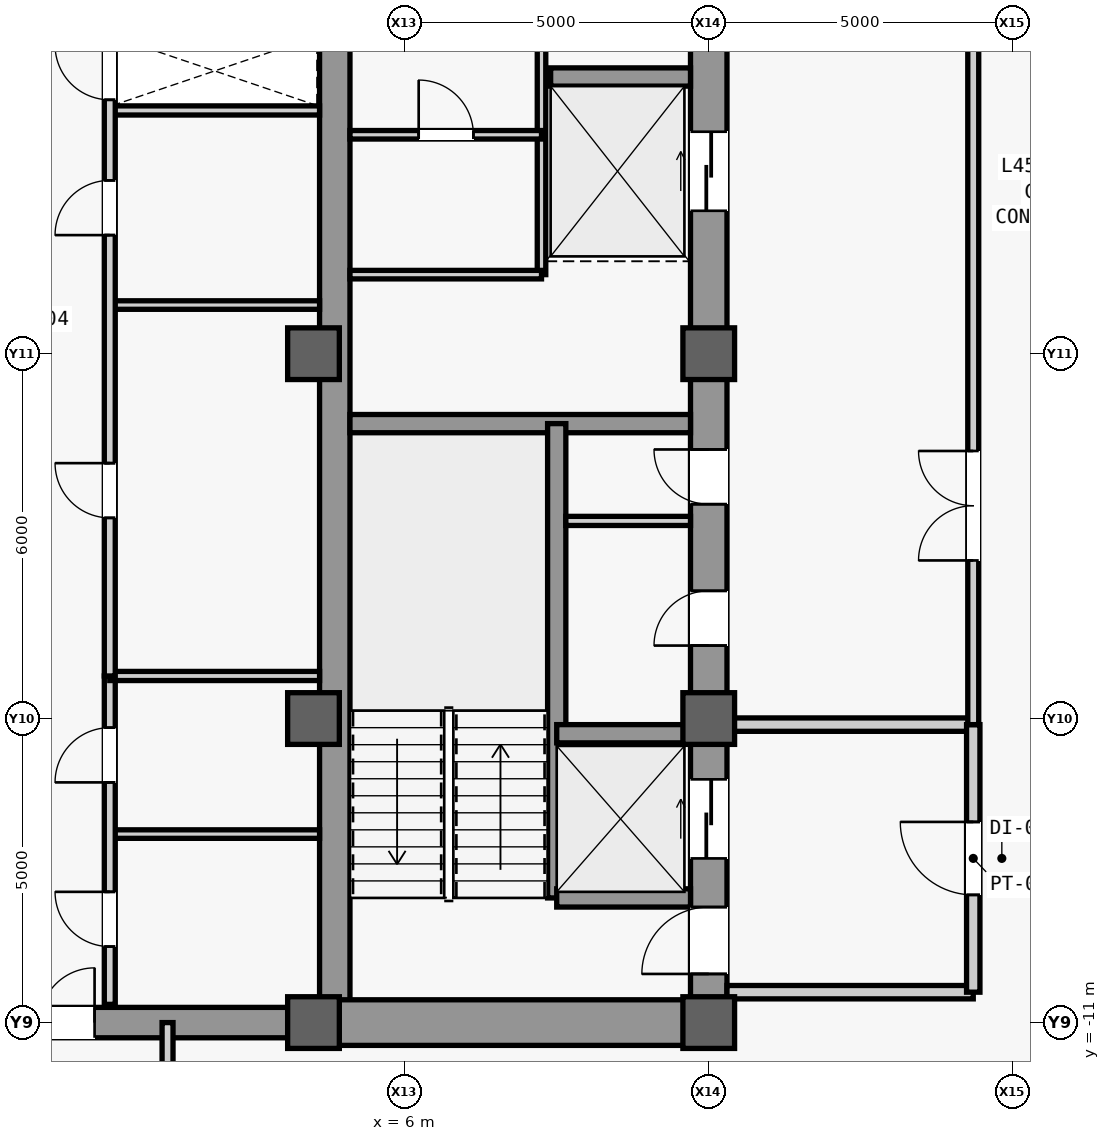
"""IFC4 building model, lengths in metres.
Left out: names, types, materials, properties, quantities, classifications, styles, units other than length and angle.
Written with IfcOpenShell. Run it as: python <this file> out.ifc"""

import sys

from ifc_helpers import new_model, si_unit, direction, frame, frame_2d, origin, origin_2d, place, context, subcontext, project, spatial, rectangle, extrude, source, transform, mapped, element, fill, save


model = new_model("IFC4")
c1 = context("Model", 3, precision=1e-05, world=origin(), true_north=direction((0.0, 1.0)))
c2 = subcontext(c1, "Body", "Model", "MODEL_VIEW")
j1 = project(units=[si_unit("LENGTHUNIT", "METRE"), si_unit("PLANEANGLEUNIT", "RADIAN")], contexts=[c1])
p1 = place(None, origin())
s1 = spatial("IfcSite", under=j1, at=p1, CompositionType="ELEMENT")
p2 = place(p1, origin())
s2 = spatial("IfcBuilding", under=s1, at=p2, CompositionType="ELEMENT")
p3 = place(p2, frame((0.0, 0.0, 195.1)))
s3 = spatial("IfcBuildingStorey", under=s2, at=p3, CompositionType="ELEMENT", Elevation=195.1)
m1 = source(origin(), c2, "Body", "SweptSolid", [
    extrude(rectangle(XDim=22.0, YDim=0.6, at=frame_2d((11.0, 0.0))), origin(), (0.0, 0.0, 1.0), 3.78),
])
p4 = place(p3, frame((11.0, -11.0, 0.0), z_axis=(0.0, 0.0, 1.0), x_axis=(0.0, 1.0, 0.0)))
e1 = element("IfcWall", 1, at=p4, inside=s3, PredefinedType="SHEAR", context=c2, shape_type="MappedRepresentation", body=[
    mapped(m1, transform((0.0, 0.0, 0.0), scale=1.0)),
])
m2 = source(origin(), c2, "Body", "SweptSolid", [
    extrude(rectangle(XDim=1.1, YDim=2.2, at=frame_2d((0.55, 1.1))), frame((0.0, 0.31, 0.0), z_axis=(0.0, -1.0, 0.0), x_axis=(1.0, 0.0, 0.0)), (0.0, 0.0, 1.0), 0.62),
])
p5 = place(p4, frame((0.8, 0.0, 0.0)))
e2 = element("IfcOpeningElement", 2, at=p5, cuts=e1, PredefinedType="OPENING", context=c2, shape_type="MappedRepresentation", body=[
    mapped(m2, transform((0.0, 0.0, 0.0), scale=1.0)),
])
m3 = source(origin(), c2, "Body", "SweptSolid", [
    extrude(rectangle(XDim=0.9, YDim=2.15, at=frame_2d((0.45, 1.075))), frame((0.0, 0.31, 0.0), z_axis=(0.0, -1.0, 0.0), x_axis=(1.0, 0.0, 0.0)), (0.0, 0.0, 1.0), 0.62),
])
p6 = place(p4, frame((6.2, 0.0, 0.0)))
e3 = element("IfcOpeningElement", 3, at=p6, cuts=e1, PredefinedType="OPENING", context=c2, shape_type="MappedRepresentation", body=[
    mapped(m3, transform((0.0, 0.0, 0.0), scale=1.0)),
])
p7 = place(p4, frame((8.525, 0.0, 0.0)))
e4 = element("IfcOpeningElement", 4, at=p7, cuts=e1, PredefinedType="OPENING", context=c2, shape_type="MappedRepresentation", body=[
    mapped(m3, transform((0.0, 0.0, 0.0), scale=1.0)),
])
m4 = source(origin(), c2, "Body", "SweptSolid", [
    extrude(rectangle(XDim=1.3, YDim=2.3, at=frame_2d((0.65, 1.15))), frame((0.0, 0.31, 0.0), z_axis=(0.0, -1.0, 0.0), x_axis=(1.0, 0.0, 0.0)), (0.0, 0.0, 1.0), 0.62),
])
p8 = place(p4, frame((2.7, 0.0, 0.0)))
e5 = element("IfcOpeningElement", 5, at=p8, cuts=e1, PredefinedType="OPENING", context=c2, shape_type="MappedRepresentation", body=[
    mapped(m4, transform((0.0, 0.0, 0.0), scale=1.0)),
])
p9 = place(p4, frame((13.35, 0.0, 0.0)))
e6 = element("IfcOpeningElement", 6, at=p9, cuts=e1, PredefinedType="OPENING", context=c2, shape_type="MappedRepresentation", body=[
    mapped(m4, transform((0.0, 0.0, 0.0), scale=1.0)),
])
m5 = source(origin(), c2, "Body", "SweptSolid", [
    extrude(rectangle(XDim=21.4, YDim=0.5, at=frame_2d((10.7, 0.0))), origin(), (0.0, 0.0, 1.0), 3.78),
])
p10 = place(p3, frame((4.85, -10.7, 0.0), z_axis=(0.0, 0.0, 1.0), x_axis=(0.0, 1.0, 0.0)))
e7 = element("IfcWall", 7, at=p10, inside=s3, PredefinedType="SHEAR", context=c2, shape_type="MappedRepresentation", body=[
    mapped(m5, transform((0.0, 0.0, 0.0), scale=1.0)),
])
m6 = source(origin(), c2, "Body", "SweptSolid", [
    extrude(rectangle(XDim=5.85, YDim=0.75, at=frame_2d((2.925, 0.0))), origin(), (0.0, 0.0, 1.0), 3.78),
])
p11 = place(p3, frame((4.85, -11.0, 0.0), z_axis=(0.0, 0.0, 1.0), x_axis=(1.0, 0.0, 0.0)))
e8 = element("IfcWall", 8, at=p11, inside=s3, PredefinedType="SHEAR", context=c2, shape_type="MappedRepresentation", body=[
    mapped(m6, transform((0.0, 0.0, 0.0), scale=1.0)),
])
m7 = source(origin(), c2, "Body", "SweptSolid", [
    extrude(rectangle(XDim=5.6, YDim=0.3, at=frame_2d((2.8, 0.0))), origin(), (0.0, 0.0, 1.0), 3.78),
])
p12 = place(p3, frame((5.1, -1.15, 0.0), z_axis=(0.0, 0.0, 1.0), x_axis=(1.0, 0.0, 0.0)))
e9 = element("IfcWall", 9, at=p12, inside=s3, PredefinedType="SHEAR", context=c2, shape_type="MappedRepresentation", body=[
    mapped(m7, transform((0.0, 0.0, 0.0), scale=1.0)),
])
m8 = source(origin(), c2, "Body", "SweptSolid", [
    extrude(rectangle(XDim=9.2, YDim=0.5, at=frame_2d((4.6, 0.0))), origin(), (0.0, 0.0, 1.0), 3.78),
])
p13 = place(p3, frame((-4.6, -11.0, 0.0), z_axis=(0.0, 0.0, 1.0), x_axis=(1.0, 0.0, 0.0)))
e10 = element("IfcWall", 10, at=p13, inside=s3, PredefinedType="SHEAR", context=c2, shape_type="MappedRepresentation", body=[
    mapped(m8, transform((0.0, 0.0, 0.0), scale=1.0)),
])
m9 = source(origin(), c2, "Body", "SweptSolid", [
    extrude(rectangle(XDim=1.8, YDim=2.25, at=frame_2d((0.9, 1.125))), frame((0.0, 0.26, 0.0), z_axis=(0.0, -1.0, 0.0), x_axis=(1.0, 0.0, 0.0)), (0.0, 0.0, 1.0), 0.52),
])
p14 = place(p13, frame((3.7, 0.0, 0.0)))
e11 = element("IfcOpeningElement", 11, at=p14, cuts=e10, PredefinedType="OPENING", context=c2, shape_type="MappedRepresentation", body=[
    mapped(m9, transform((0.0, 0.0, 0.0), scale=1.0)),
])
m10 = source(origin(), c2, "Body", "SweptSolid", [
    extrude(rectangle(XDim=0.85, YDim=0.85, at=origin_2d()), origin(), (0.0, 0.0, 1.0), 4.0),
])
for number, where, z_axis, x_axis in (
    (12, (4.5, -11.0, 0.0), (0.0, 0.0, 1.0), (1.0, 0.0, 0.0)),
    (13, (4.5, -6.0, 0.0), (0.0, 0.0, 1.0), (1.0, 0.0, 0.0)),
    (14, (4.5, 0.0, 0.0), (0.0, 0.0, 1.0), (1.0, 0.0, 0.0)),
    (15, (11.0, -11.0, 0.0), (0.0, 0.0, 1.0), (1.0, 0.0, 0.0)),
    (16, (11.0, -6.0, 0.0), (0.0, 0.0, 1.0), (1.0, 0.0, 0.0)),
    (17, (11.0, 0.0, 0.0), (0.0, 0.0, 1.0), (1.0, 0.0, 0.0)),
):
    element("IfcColumn", number, at=place(p3, frame(where, z_axis=z_axis, x_axis=x_axis)), inside=s3, PredefinedType="COLUMN", context=c2, shape_type="MappedRepresentation", body=[
        mapped(m10, transform((0.0, 0.0, 0.0), scale=1.0)),
    ])
m11 = source(origin(), c2, "Body", "SweptSolid", [
    extrude(rectangle(XDim=7.8, YDim=0.3, at=frame_2d((3.9, 0.0))), origin(), (0.0, 0.0, 1.0), 3.78),
])
p15 = place(p3, frame((8.5, -8.95, 0.0), z_axis=(0.0, 0.0, 1.0), x_axis=(0.0, 1.0, 0.0)))
e18 = element("IfcWall", 18, at=p15, inside=s3, PredefinedType="SHEAR", context=c2, shape_type="MappedRepresentation", body=[
    mapped(m11, transform((0.0, 0.0, 0.0), scale=1.0)),
])
m12 = source(origin(), c2, "Body", "SweptSolid", [
    extrude(rectangle(XDim=2.2, YDim=0.3, at=frame_2d((1.1, 0.0))), origin(), (0.0, 0.0, 1.0), 3.78),
])
for number, where, z_axis, x_axis in (
    (19, (8.5, -8.95, 0.0), (0.0, 0.0, 1.0), (1.0, 0.0, 0.0)),
    (20, (8.5, -6.25, 0.0), (0.0, 0.0, 1.0), (1.0, 0.0, 0.0)),
):
    element("IfcWall", number, at=place(p3, frame(where, z_axis=z_axis, x_axis=x_axis)), inside=s3, PredefinedType="SHEAR", context=c2, shape_type="MappedRepresentation", body=[
        mapped(m12, transform((0.0, 0.0, 0.0), scale=1.0)),
    ])
m13 = source(origin(), c2, "Body", "SweptSolid", [
    extrude(rectangle(XDim=2.3, YDim=0.3, at=frame_2d((1.15, 0.0))), origin(), (0.0, 0.0, 1.0), 3.78),
])
p16 = place(p3, frame((8.4, 4.55, 0.0), z_axis=(0.0, 0.0, 1.0), x_axis=(1.0, 0.0, 0.0)))
e21 = element("IfcWall", 21, at=p16, inside=s3, PredefinedType="SHEAR", context=c2, shape_type="MappedRepresentation", body=[
    mapped(m13, transform((0.0, 0.0, 0.0), scale=1.0)),
])
m14 = source(origin(), c2, "Body", "SweptSolid", [
    extrude(rectangle(XDim=2.05, YDim=0.15, at=frame_2d((1.025, 0.0))), origin(), (0.0, 0.0, 1.0), 3.78),
])
p17 = place(p3, frame((8.65, -2.75, 0.0), z_axis=(0.0, 0.0, 1.0), x_axis=(1.0, 0.0, 0.0)))
e22 = element("IfcWall", 22, at=p17, inside=s3, PredefinedType="PARTITIONING", context=c2, shape_type="MappedRepresentation", body=[
    mapped(m14, transform((0.0, 0.0, 0.0), scale=1.0)),
])
m15 = source(origin(), c2, "Body", "SweptSolid", [
    extrude(rectangle(XDim=9.4, YDim=0.14, at=frame_2d((4.7, 0.0))), origin(), (0.0, 0.0, 1.0), 3.78),
])
p18 = place(p3, frame((8.25, 1.3, 0.0), z_axis=(0.0, 0.0, 1.0), x_axis=(0.0, 1.0, 0.0)))
e23 = element("IfcWall", 23, at=p18, inside=s3, PredefinedType="PARTITIONING", context=c2, shape_type="MappedRepresentation", body=[
    mapped(m15, transform((0.0, 0.0, 0.0), scale=1.0)),
])
m16 = source(origin(), c2, "Body", "SweptSolid", [
    extrude(rectangle(XDim=3.15, YDim=0.14, at=frame_2d((1.575, 0.0))), origin(), (0.0, 0.0, 1.0), 3.78),
])
p19 = place(p3, frame((5.1, 1.3, 0.0), z_axis=(0.0, 0.0, 1.0), x_axis=(1.0, 0.0, 0.0)))
e24 = element("IfcWall", 24, at=p19, inside=s3, PredefinedType="PARTITIONING", context=c2, shape_type="MappedRepresentation", body=[
    mapped(m16, transform((0.0, 0.0, 0.0), scale=1.0)),
])
p20 = place(p3, frame((5.1, 3.6, 0.0), z_axis=(0.0, 0.0, 1.0), x_axis=(1.0, 0.0, 0.0)))
e25 = element("IfcWall", 25, at=p20, inside=s3, PredefinedType="PARTITIONING", context=c2, shape_type="MappedRepresentation", body=[
    mapped(m16, transform((0.0, 0.0, 0.0), scale=1.0)),
])
m17 = source(origin(), c2, "Body", "SweptSolid", [
    extrude(rectangle(XDim=0.9, YDim=2.15, at=frame_2d((0.45, 1.075))), frame((0.0, 0.08, 0.0), z_axis=(0.0, -1.0, 0.0), x_axis=(1.0, 0.0, 0.0)), (0.0, 0.0, 1.0), 0.16),
])
p21 = place(p20, frame((1.13, 0.0, 0.0)))
e26 = element("IfcOpeningElement", 26, at=p21, cuts=e25, PredefinedType="OPENING", context=c2, shape_type="MappedRepresentation", body=[
    mapped(m17, transform((0.0, 0.0, 0.0), scale=1.0)),
])
m18 = source(origin(), c2, "Body", "SweptSolid", [
    extrude(rectangle(XDim=4.05, YDim=0.22, at=frame_2d((2.025, 0.0))), origin(), (0.0, 0.0, 1.0), 3.78),
])
p22 = place(p3, frame((11.3, -10.5, 0.0), z_axis=(0.0, 0.0, 1.0), x_axis=(1.0, 0.0, 0.0)))
e27 = element("IfcWall", 27, at=p22, inside=s3, PredefinedType="PARTITIONING", context=c2, shape_type="MappedRepresentation", body=[
    mapped(m18, transform((0.0, 0.0, 0.0), scale=1.0)),
])
m19 = source(origin(), c2, "Body", "SweptSolid", [
    extrude(rectangle(XDim=4.05, YDim=0.22, at=frame_2d((2.025, 0.0))), origin(), (0.0, 0.0, 1.0), 3.007),
])
p23 = place(p3, frame((11.3, -6.1, 0.0), z_axis=(0.0, 0.0, 1.0), x_axis=(1.0, 0.0, 0.0)))
e28 = element("IfcWall", 28, at=p23, inside=s3, PredefinedType="PARTITIONING", context=c2, shape_type="MappedRepresentation", body=[
    mapped(m19, transform((0.0, 0.0, 0.0), scale=1.0)),
])
m20 = source(origin(), c2, "Body", "SweptSolid", [
    extrude(rectangle(XDim=4.4, YDim=0.22, at=frame_2d((2.2, 0.0))), origin(), (0.0, 0.0, 1.0), 3.78),
])
p24 = place(p3, frame((15.35, -10.5, 0.0), z_axis=(0.0, 0.0, 1.0), x_axis=(0.0, 1.0, 0.0)))
e29 = element("IfcWall", 29, at=p24, inside=s3, PredefinedType="PARTITIONING", context=c2, shape_type="MappedRepresentation", body=[
    mapped(m20, transform((0.0, 0.0, 0.0), scale=1.0)),
])
m21 = source(origin(), c2, "Body", "SweptSolid", [
    extrude(rectangle(XDim=1.2, YDim=2.2, at=frame_2d((0.6, 1.1))), frame((0.0, 0.12, 0.0), z_axis=(0.0, -1.0, 0.0), x_axis=(1.0, 0.0, 0.0)), (0.0, 0.0, 1.0), 0.24),
])
p25 = place(p24, frame((1.6, 0.0, 0.0)))
e30 = element("IfcOpeningElement", 30, at=p25, cuts=e29, PredefinedType="OPENING", context=c2, shape_type="MappedRepresentation", body=[
    mapped(m21, transform((0.0, 0.0, 0.0), scale=1.0)),
])
m22 = source(origin(), c2, "Body", "SweptSolid", [
    extrude(rectangle(XDim=16.6, YDim=0.18, at=frame_2d((8.3, 0.0))), origin(), (0.0, 0.0, 1.0), 3.78),
])
p26 = place(p3, frame((15.35, -6.1, 0.0), z_axis=(0.0, 0.0, 1.0), x_axis=(0.0, 1.0, 0.0)))
e31 = element("IfcWall", 31, at=p26, inside=s3, PredefinedType="PARTITIONING", context=c2, shape_type="MappedRepresentation", body=[
    mapped(m22, transform((0.0, 0.0, 0.0), scale=1.0)),
])
m23 = source(origin(), c2, "Body", "SweptSolid", [
    extrude(rectangle(XDim=1.8, YDim=2.25, at=frame_2d((0.9, 1.125))), frame((0.0, 0.1, 0.0), z_axis=(0.0, -1.0, 0.0), x_axis=(1.0, 0.0, 0.0)), (0.0, 0.0, 1.0), 0.2),
])
p27 = place(p26, frame((2.7, 0.0, 0.0)))
e32 = element("IfcOpeningElement", 32, at=p27, cuts=e31, PredefinedType="OPENING", context=c2, shape_type="MappedRepresentation", body=[
    mapped(m23, transform((0.0, 0.0, 0.0), scale=1.0)),
])
p28 = place(p26, frame((13.0, 0.0, 0.0)))
e33 = element("IfcOpeningElement", 33, at=p28, cuts=e31, PredefinedType="OPENING", context=c2, shape_type="MappedRepresentation", body=[
    mapped(m23, transform((0.0, 0.0, 0.0), scale=1.0)),
])
m24 = source(origin(), c2, "Body", "SweptSolid", [
    extrude(rectangle(XDim=3.45, YDim=0.15, at=frame_2d((1.725, 0.0))), origin(), (0.0, 0.0, 1.0), 3.78),
])
p29 = place(p3, frame((1.15, 4.0, 0.0), z_axis=(0.0, 0.0, 1.0), x_axis=(1.0, 0.0, 0.0)))
e34 = element("IfcWall", 34, at=p29, inside=s3, PredefinedType="PARTITIONING", context=c2, shape_type="MappedRepresentation", body=[
    mapped(m24, transform((0.0, 0.0, 0.0), scale=1.0)),
])
m25 = source(origin(), c2, "Body", "SweptSolid", [
    extrude(rectangle(XDim=3.45, YDim=0.14, at=frame_2d((1.725, 0.0))), origin(), (0.0, 0.0, 1.0), 3.78),
])
p30 = place(p3, frame((1.15, -7.9, 0.0), z_axis=(0.0, 0.0, 1.0), x_axis=(1.0, 0.0, 0.0)))
e35 = element("IfcWall", 35, at=p30, inside=s3, PredefinedType="PARTITIONING", context=c2, shape_type="MappedRepresentation", body=[
    mapped(m25, transform((0.0, 0.0, 0.0), scale=1.0)),
])
m26 = source(origin(), c2, "Body", "SweptSolid", [
    extrude(rectangle(XDim=5.4, YDim=0.18, at=frame_2d((2.7, 0.0))), origin(), (0.0, 0.0, 1.0), 3.78),
])
p31 = place(p3, frame((1.15, -10.7, 0.0), z_axis=(0.0, 0.0, 1.0), x_axis=(0.0, 1.0, 0.0)))
e36 = element("IfcWall", 36, at=p31, inside=s3, PredefinedType="PARTITIONING", context=c2, shape_type="MappedRepresentation", body=[
    mapped(m26, transform((0.0, 0.0, 0.0), scale=1.0)),
])
m27 = source(origin(), c2, "Body", "SweptSolid", [
    extrude(rectangle(XDim=0.9, YDim=2.15, at=frame_2d((0.45, 1.075))), frame((0.0, 0.1, 0.0), z_axis=(0.0, -1.0, 0.0), x_axis=(1.0, 0.0, 0.0)), (0.0, 0.0, 1.0), 0.2),
])
p32 = place(p31, frame((0.95, 0.0, 0.0)))
e37 = element("IfcOpeningElement", 37, at=p32, cuts=e36, PredefinedType="OPENING", context=c2, shape_type="MappedRepresentation", body=[
    mapped(m27, transform((0.0, 0.0, 0.0), scale=1.0)),
])
p33 = place(p31, frame((3.65, 0.0, 0.0)))
e38 = element("IfcOpeningElement", 38, at=p33, cuts=e36, PredefinedType="OPENING", context=c2, shape_type="MappedRepresentation", body=[
    mapped(m27, transform((0.0, 0.0, 0.0), scale=1.0)),
])
p34 = place(p3, frame((1.15, -5.3, 0.0), z_axis=(0.0, 0.0, 1.0), x_axis=(1.0, 0.0, 0.0)))
e39 = element("IfcWall", 39, at=p34, inside=s3, PredefinedType="PARTITIONING", context=c2, shape_type="MappedRepresentation", body=[
    mapped(m24, transform((0.0, 0.0, 0.0), scale=1.0)),
])
p35 = place(p3, frame((1.15, 0.8, 0.0), z_axis=(0.0, 0.0, 1.0), x_axis=(1.0, 0.0, 0.0)))
e40 = element("IfcWall", 40, at=p35, inside=s3, PredefinedType="PARTITIONING", context=c2, shape_type="MappedRepresentation", body=[
    mapped(m25, transform((0.0, 0.0, 0.0), scale=1.0)),
])
m28 = source(origin(), c2, "Body", "SweptSolid", [
    extrude(rectangle(XDim=10.6, YDim=0.18, at=frame_2d((5.3, 0.0))), origin(), (0.0, 0.0, 1.0), 3.78),
])
p36 = place(p3, frame((1.15, -5.3, 0.0), z_axis=(0.0, 0.0, 1.0), x_axis=(0.0, 1.0, 0.0)))
e41 = element("IfcWall", 41, at=p36, inside=s3, PredefinedType="PARTITIONING", context=c2, shape_type="MappedRepresentation", body=[
    mapped(m28, transform((0.0, 0.0, 0.0), scale=1.0)),
])
p37 = place(p36, frame((2.6, 0.0, 0.0)))
e42 = element("IfcOpeningElement", 42, at=p37, cuts=e41, PredefinedType="OPENING", context=c2, shape_type="MappedRepresentation", body=[
    mapped(m27, transform((0.0, 0.0, 0.0), scale=1.0)),
])
p38 = place(p36, frame((7.25, 0.0, 0.0)))
e43 = element("IfcOpeningElement", 43, at=p38, cuts=e41, PredefinedType="OPENING", context=c2, shape_type="MappedRepresentation", body=[
    mapped(m27, transform((0.0, 0.0, 0.0), scale=1.0)),
])
p39 = place(p36, frame((9.475, 0.0, 0.0)))
e44 = element("IfcOpeningElement", 44, at=p39, cuts=e41, PredefinedType="OPENING", context=c2, shape_type="MappedRepresentation", body=[
    mapped(m27, transform((0.0, 0.0, 0.0), scale=1.0)),
])
m29 = source(origin(), c2, "Body", "SweptSolid", [
    extrude(rectangle(XDim=3.2, YDim=0.18, at=frame_2d((1.6, 0.0))), origin(), (0.0, 0.0, 1.0), 3.78),
])
p40 = place(p3, frame((2.1, -14.2, 0.0), z_axis=(0.0, 0.0, 1.0), x_axis=(0.0, 1.0, 0.0)))
e45 = element("IfcWall", 45, at=p40, inside=s3, PredefinedType="PARTITIONING", context=c2, shape_type="MappedRepresentation", body=[
    mapped(m29, transform((0.0, 0.0, 0.0), scale=1.0)),
])
m30 = source(origin(), c2, "Body", "SweptSolid", [
    extrude(rectangle(XDim=1.1, YDim=2.2, at=frame_2d((0.55, 1.1))), frame((0.0, 0.025, 0.0), z_axis=(0.0, -1.0, 0.0), x_axis=(1.0, 0.0, 0.0)), (0.0, 0.0, 1.0), 0.05),
])
p41 = place(p5, origin())
e46 = element("IfcDoor", 46, at=p41, inside=s3, OperationType="SINGLE_SWING_LEFT", PredefinedType="DOOR", context=c2, shape_type="MappedRepresentation", body=[
    mapped(m30, transform((0.0, 0.0, 0.0), scale=1.0)),
])
fill(e2, e46)
m31 = source(origin(), c2, "Body", "SweptSolid", [
    extrude(rectangle(XDim=0.9, YDim=2.15, at=frame_2d((0.45, 1.075))), frame((0.0, 0.025, 0.0), z_axis=(0.0, -1.0, 0.0), x_axis=(1.0, 0.0, 0.0)), (0.0, 0.0, 1.0), 0.05),
])
p42 = place(p6, origin())
e47 = element("IfcDoor", 47, at=p42, inside=s3, OperationType="SINGLE_SWING_LEFT", PredefinedType="DOOR", context=c2, shape_type="MappedRepresentation", body=[
    mapped(m31, transform((0.0, 0.0, 0.0), scale=1.0)),
])
fill(e3, e47)
p43 = place(p7, origin())
e48 = element("IfcDoor", 48, at=p43, inside=s3, OperationType="SINGLE_SWING_RIGHT", PredefinedType="DOOR", context=c2, shape_type="MappedRepresentation", body=[
    mapped(m31, transform((0.0, 0.0, 0.0), scale=1.0)),
])
fill(e4, e48)
p44 = place(p21, origin())
e49 = element("IfcDoor", 49, at=p44, inside=s3, OperationType="SINGLE_SWING_LEFT", PredefinedType="DOOR", context=c2, shape_type="MappedRepresentation", body=[
    mapped(m31, transform((0.0, 0.0, 0.0), scale=1.0)),
])
fill(e26, e49)
m32 = source(origin(), c2, "Body", "SweptSolid", [
    extrude(rectangle(XDim=1.2, YDim=2.2, at=frame_2d((0.6, 1.1))), frame((0.0, 0.025, 0.0), z_axis=(0.0, -1.0, 0.0), x_axis=(1.0, 0.0, 0.0)), (0.0, 0.0, 1.0), 0.05),
])
p45 = place(p25, origin())
e50 = element("IfcDoor", 50, at=p45, inside=s3, OperationType="SINGLE_SWING_RIGHT", PredefinedType="DOOR", context=c2, shape_type="MappedRepresentation", body=[
    mapped(m32, transform((0.0, 0.0, 0.0), scale=1.0)),
])
fill(e30, e50)
m33 = source(origin(), c2, "Body", "SweptSolid", [
    extrude(rectangle(XDim=1.8, YDim=2.25, at=frame_2d((0.9, 1.125))), frame((0.0, 0.025, 0.0), z_axis=(0.0, -1.0, 0.0), x_axis=(1.0, 0.0, 0.0)), (0.0, 0.0, 1.0), 0.05),
])
p46 = place(p27, origin())
e51 = element("IfcDoor", 51, at=p46, inside=s3, OperationType="SINGLE_SWING_RIGHT", PredefinedType="DOOR", context=c2, shape_type="MappedRepresentation", body=[
    mapped(m33, transform((0.0, 0.0, 0.0), scale=1.0)),
])
fill(e32, e51)
p47 = place(p32, origin())
e52 = element("IfcDoor", 52, at=p47, inside=s3, OperationType="SINGLE_SWING_RIGHT", PredefinedType="DOOR", context=c2, shape_type="MappedRepresentation", body=[
    mapped(m31, transform((0.0, 0.0, 0.0), scale=1.0)),
])
fill(e37, e52)
p48 = place(p33, origin())
e53 = element("IfcDoor", 53, at=p48, inside=s3, OperationType="SINGLE_SWING_LEFT", PredefinedType="DOOR", context=c2, shape_type="MappedRepresentation", body=[
    mapped(m31, transform((0.0, 0.0, 0.0), scale=1.0)),
])
fill(e38, e53)
p49 = place(p14, origin())
e54 = element("IfcDoor", 54, at=p49, inside=s3, OperationType="SINGLE_SWING_LEFT", PredefinedType="DOOR", context=c2, shape_type="MappedRepresentation", body=[
    mapped(m33, transform((0.0, 0.0, 0.0), scale=1.0)),
])
fill(e11, e54)
p50 = place(p37, origin())
e55 = element("IfcDoor", 55, at=p50, inside=s3, OperationType="SINGLE_SWING_RIGHT", PredefinedType="DOOR", context=c2, shape_type="MappedRepresentation", body=[
    mapped(m31, transform((0.0, 0.0, 0.0), scale=1.0)),
])
fill(e42, e55)
p51 = place(p38, origin())
e56 = element("IfcDoor", 56, at=p51, inside=s3, OperationType="SINGLE_SWING_LEFT", PredefinedType="DOOR", context=c2, shape_type="MappedRepresentation", body=[
    mapped(m31, transform((0.0, 0.0, 0.0), scale=1.0)),
])
fill(e43, e56)
p52 = place(p39, origin())
e57 = element("IfcDoor", 57, at=p52, inside=s3, OperationType="SINGLE_SWING_RIGHT", PredefinedType="DOOR", context=c2, shape_type="MappedRepresentation", body=[
    mapped(m31, transform((0.0, 0.0, 0.0), scale=1.0)),
])
fill(e44, e57)
m34 = source(origin(), c2, "Body", "SweptSolid", [
    extrude(rectangle(XDim=1.3, YDim=2.3, at=frame_2d((0.65, 1.15))), frame((0.0, 0.025, 0.0), z_axis=(0.0, -1.0, 0.0), x_axis=(1.0, 0.0, 0.0)), (0.0, 0.0, 1.0), 0.05),
])
p53 = place(p8, origin())
e58 = element("IfcDoor", 58, at=p53, inside=s3, OperationType="SLIDING_TO_LEFT", PredefinedType="DOOR", context=c2, shape_type="MappedRepresentation", body=[
    mapped(m34, transform((0.0, 0.0, 0.0), scale=1.0)),
])
fill(e5, e58)
p54 = place(p9, origin())
e59 = element("IfcDoor", 59, at=p54, inside=s3, OperationType="SLIDING_TO_LEFT", PredefinedType="DOOR", context=c2, shape_type="MappedRepresentation", body=[
    mapped(m34, transform((0.0, 0.0, 0.0), scale=1.0)),
])
fill(e6, e59)
save(model, sys.argv[1])
